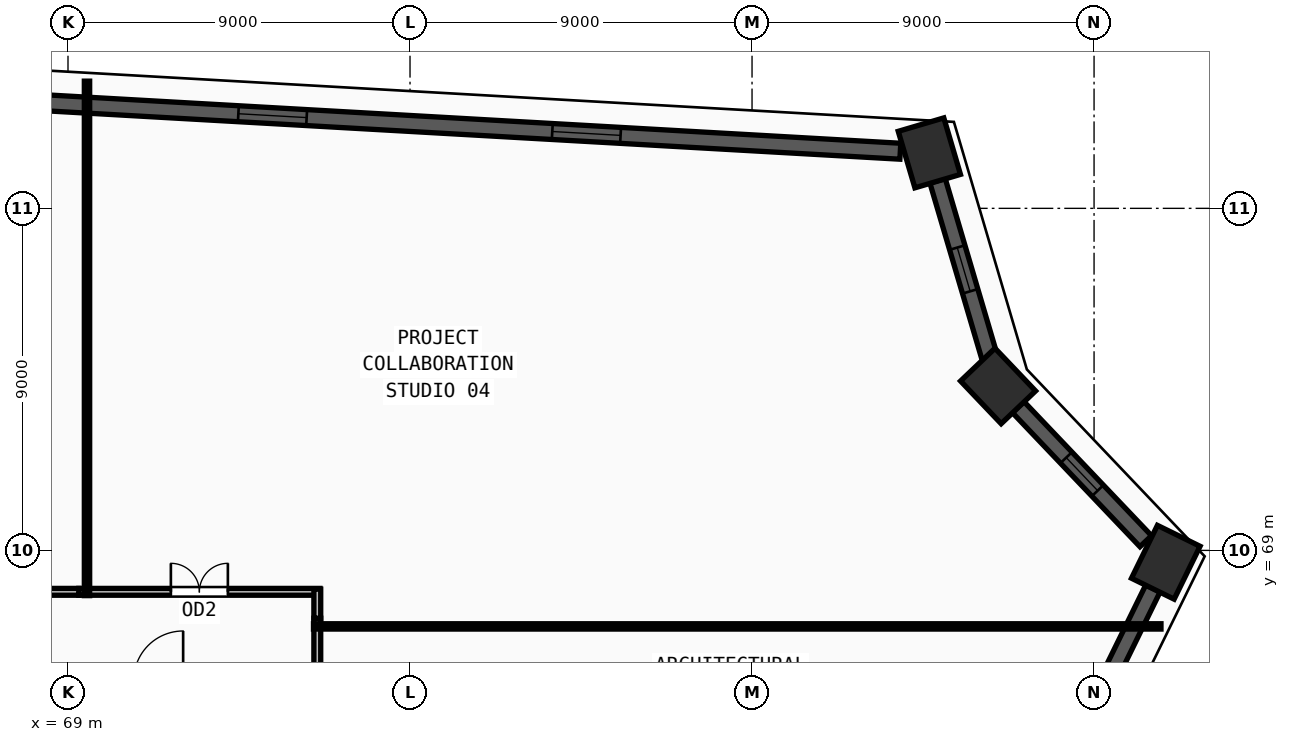
"""IFC4 building model, lengths in metres.
Left out: names, types, materials, properties, quantities, classifications, styles, units other than length and angle.
Written with IfcOpenShell. Run it as: python <this file> out.ifc"""

import sys

from ifc_helpers import new_model, si_unit, direction, frame, frame_2d, origin, origin_2d, place, context, subcontext, project, spatial, rectangle, extrude, source, transform, mapped, element, fill, save


model = new_model("IFC4")
c1 = context("Model", 3, precision=1e-05, world=origin(), true_north=direction((0.0, 1.0)))
c2 = subcontext(c1, "Body", "Model", "MODEL_VIEW")
j1 = project(units=[si_unit("LENGTHUNIT", "METRE"), si_unit("PLANEANGLEUNIT", "RADIAN")], contexts=[c1])
p1 = place(None, origin())
s1 = spatial("IfcSite", under=j1, at=p1, CompositionType="ELEMENT")
p2 = place(p1, origin())
s2 = spatial("IfcBuilding", under=s1, at=p2, CompositionType="ELEMENT")
p3 = place(p2, frame((0.0, 0.0, 74.25)))
s3 = spatial("IfcBuildingStorey", under=s2, at=p3, CompositionType="ELEMENT", Elevation=74.25)
m1 = source(origin(), c2, "Body", "SweptSolid", [
    extrude(rectangle(XDim=1.55, YDim=1.25, at=origin_2d()), origin(), (0.0, 0.0, 1.0), 3.75),
])
for number, where, z_axis, x_axis in (
    (1, (91.666, 79.46, 0.0), (0.0, 0.0, 1.0), (-0.283, 0.959, 0.0)),
    (2, (93.474, 73.326, 0.0), (0.0, 0.0, 1.0), (-0.689, 0.724, 0.0)),
    (3, (97.887, 68.688, 0.0), (0.0, 0.0, 1.0), (0.44, 0.898, 0.0)),
):
    element("IfcColumn", number, at=place(p3, frame(where, z_axis=z_axis, x_axis=x_axis)), inside=s3, PredefinedType="COLUMN", context=c2, shape_type="MappedRepresentation", body=[
        mapped(m1, transform((0.0, 0.0, 0.0), x_axis=(1.0, 0.0, 0.0), y_axis=(0.0, 1.0, 0.0), z_axis=(0.0, 0.0, 1.0), scale=1.0)),
    ])
p4 = place(p3, frame((85.533, 43.493, 0.0), z_axis=(0.0, 0.0, 1.0), x_axis=(0.440255770672, 0.897872405406, 0.0)))
e4 = element("IfcWall", 4, at=p4, inside=s3, PredefinedType="SOLIDWALL", context=c2, shape_type="SweptSolid", body=[
    extrude(rectangle(XDim=27.296, YDim=0.42, at=frame_2d((13.648, 0.0))), origin(), (0.0, 0.0, 1.0), 3.57),
])
m2 = source(origin(), c2, "Body", "SweptSolid", [
    extrude(rectangle(XDim=1.8, YDim=1.95, at=frame_2d((0.9, 0.975))), frame((0.0, 0.22, 0.0), z_axis=(0.0, -1.0, 0.0), x_axis=(1.0, 0.0, 0.0)), (0.0, 0.0, 1.0), 0.44),
])
p5 = place(p4, frame((5.074, 0.0, 0.55)))
e5 = element("IfcOpeningElement", 5, at=p5, cuts=e4, PredefinedType="OPENING", context=c2, shape_type="MappedRepresentation", body=[
    mapped(m2, transform((0.0, 0.0, 0.0), x_axis=(1.0, 0.0, 0.0), y_axis=(0.0, 1.0, 0.0), z_axis=(0.0, 0.0, 1.0), scale=1.0)),
])
p6 = place(p4, frame((11.898, 0.0, 0.55)))
e6 = element("IfcOpeningElement", 6, at=p6, cuts=e4, PredefinedType="OPENING", context=c2, shape_type="MappedRepresentation", body=[
    mapped(m2, transform((0.0, 0.0, 0.0), x_axis=(1.0, 0.0, 0.0), y_axis=(0.0, 1.0, 0.0), z_axis=(0.0, 0.0, 1.0), scale=1.0)),
])
p7 = place(p4, frame((19.572, 0.0, 0.55)))
e7 = element("IfcOpeningElement", 7, at=p7, cuts=e4, PredefinedType="OPENING", context=c2, shape_type="MappedRepresentation", body=[
    mapped(m2, transform((0.0, 0.0, 0.0), x_axis=(1.0, 0.0, 0.0), y_axis=(0.0, 1.0, 0.0), z_axis=(0.0, 0.0, 1.0), scale=1.0)),
])
p8 = place(p3, frame((97.36, 69.242, 0.0), z_axis=(0.0, 0.0, 1.0), x_axis=(-0.689353606937, 0.724425016549, 0.0)))
e8 = element("IfcWall", 8, at=p8, inside=s3, PredefinedType="SOLIDWALL", context=c2, shape_type="SweptSolid", body=[
    extrude(rectangle(XDim=4.873, YDim=0.42, at=frame_2d((2.437, 0.0))), origin(), (0.0, 0.0, 1.0), 3.57),
])
m3 = source(origin(), c2, "Body", "SweptSolid", [
    extrude(rectangle(XDim=1.2, YDim=1.9, at=frame_2d((0.6, 0.95))), frame((0.0, 0.22, 0.0), z_axis=(0.0, -1.0, 0.0), x_axis=(1.0, 0.0, 0.0)), (0.0, 0.0, 1.0), 0.44),
])
p9 = place(p8, frame((1.836, 0.0, 0.55)))
e9 = element("IfcOpeningElement", 9, at=p9, cuts=e8, PredefinedType="OPENING", context=c2, shape_type="MappedRepresentation", body=[
    mapped(m3, transform((0.0, 0.0, 0.0), x_axis=(1.0, 0.0, 0.0), y_axis=(0.0, 1.0, 0.0), z_axis=(0.0, 0.0, 1.0), scale=1.0)),
])
p10 = place(p3, frame((93.258, 74.06, 0.0), z_axis=(0.0, 0.0, 1.0), x_axis=(-0.282850961841, 0.959163872019, 0.0)))
e10 = element("IfcWall", 10, at=p10, inside=s3, PredefinedType="SOLIDWALL", context=c2, shape_type="SweptSolid", body=[
    extrude(rectangle(XDim=4.865, YDim=0.42, at=frame_2d((2.432, 0.0))), origin(), (0.0, 0.0, 1.0), 3.57),
])
p11 = place(p10, frame((1.832, 0.0, 0.55)))
e11 = element("IfcOpeningElement", 11, at=p11, cuts=e10, PredefinedType="OPENING", context=c2, shape_type="MappedRepresentation", body=[
    mapped(m3, transform((0.0, 0.0, 0.0), x_axis=(1.0, 0.0, 0.0), y_axis=(0.0, 1.0, 0.0), z_axis=(0.0, 0.0, 1.0), scale=1.0)),
])
p12 = place(p3, frame((90.902, 79.503, 0.0), z_axis=(0.0, 0.0, 1.0), x_axis=(-0.998398734181, 0.056568255998, 0.0)))
e12 = element("IfcWall", 12, at=p12, inside=s3, PredefinedType="SOLIDWALL", context=c2, shape_type="SweptSolid", body=[
    extrude(rectangle(XDim=33.094, YDim=0.42, at=frame_2d((16.547, 0.0))), origin(), (0.0, 0.0, 1.0), 3.57),
])
p13 = place(p12, frame((7.373, 0.0, 0.55)))
e13 = element("IfcOpeningElement", 13, at=p13, cuts=e12, PredefinedType="OPENING", context=c2, shape_type="MappedRepresentation", body=[
    mapped(m2, transform((0.0, 0.0, 0.0), x_axis=(1.0, 0.0, 0.0), y_axis=(0.0, 1.0, 0.0), z_axis=(0.0, 0.0, 1.0), scale=1.0)),
])
p14 = place(p12, frame((15.647, 0.0, 0.55)))
e14 = element("IfcOpeningElement", 14, at=p14, cuts=e12, PredefinedType="OPENING", context=c2, shape_type="MappedRepresentation", body=[
    mapped(m2, transform((0.0, 0.0, 0.0), x_axis=(1.0, 0.0, 0.0), y_axis=(0.0, 1.0, 0.0), z_axis=(0.0, 0.0, 1.0), scale=1.0)),
])
p15 = place(p12, frame((23.92, 0.0, 0.55)))
e15 = element("IfcOpeningElement", 15, at=p15, cuts=e12, PredefinedType="OPENING", context=c2, shape_type="MappedRepresentation", body=[
    mapped(m2, transform((0.0, 0.0, 0.0), x_axis=(1.0, 0.0, 0.0), y_axis=(0.0, 1.0, 0.0), z_axis=(0.0, 0.0, 1.0), scale=1.0)),
])
p16 = place(p3, frame((75.56, 67.215, 0.0), z_axis=(0.0, 0.0, 1.0), x_axis=(0.0, -1.0, 0.0)))
e16 = element("IfcWall", 16, at=p16, inside=s3, PredefinedType="PARTITIONING", context=c2, shape_type="SweptSolid", body=[
    extrude(rectangle(XDim=3.5, YDim=0.18, at=frame_2d((1.75, 0.0))), origin(), (0.0, 0.0, 1.0), 3.57),
])
m4 = source(origin(), c2, "Body", "SweptSolid", [
    extrude(rectangle(XDim=1.0, YDim=2.2, at=frame_2d((0.5, 1.1))), frame((0.0, 0.1, 0.0), z_axis=(0.0, -1.0, 0.0), x_axis=(1.0, 0.0, 0.0)), (0.0, 0.0, 1.0), 0.2),
])
p17 = place(p16, frame((1.25, 0.0, 0.0)))
e17 = element("IfcOpeningElement", 17, at=p17, cuts=e16, PredefinedType="OPENING", context=c2, shape_type="MappedRepresentation", body=[
    mapped(m4, transform((0.0, 0.0, 0.0), x_axis=(1.0, 0.0, 0.0), y_axis=(0.0, 1.0, 0.0), z_axis=(0.0, 0.0, 1.0), scale=1.0)),
])
p18 = place(p3, frame((69.285, 67.91, 0.0), z_axis=(0.0, 0.0, 1.0), x_axis=(1.0, 0.0, 0.0)))
e18 = element("IfcWall", 18, at=p18, inside=s3, PredefinedType="PARTITIONING", context=c2, shape_type="SweptSolid", body=[
    extrude(rectangle(XDim=6.345, YDim=0.18, at=frame_2d((3.172, 0.0))), origin(), (0.0, 0.0, 1.0), 3.57),
])
m5 = source(origin(), c2, "Body", "SweptSolid", [
    extrude(rectangle(XDim=1.5, YDim=2.2, at=frame_2d((0.75, 1.1))), frame((0.0, 0.1, 0.0), z_axis=(0.0, -1.0, 0.0), x_axis=(1.0, 0.0, 0.0)), (0.0, 0.0, 1.0), 0.2),
])
p19 = place(p18, frame((2.422, 0.0, 0.0)))
e19 = element("IfcOpeningElement", 19, at=p19, cuts=e18, PredefinedType="OPENING", context=c2, shape_type="MappedRepresentation", body=[
    mapped(m5, transform((0.0, 0.0, 0.0), x_axis=(1.0, 0.0, 0.0), y_axis=(0.0, 1.0, 0.0), z_axis=(0.0, 0.0, 1.0), scale=1.0)),
])
p20 = place(p3, frame((75.56, 67.98, 0.0), z_axis=(0.0, 0.0, 1.0), x_axis=(0.0, -1.0, 0.0)))
e20 = element("IfcWall", 20, at=p20, inside=s3, PredefinedType="PARTITIONING", context=c2, shape_type="SweptSolid", body=[
    extrude(rectangle(XDim=0.765, YDim=0.18, at=frame_2d((0.382, 0.0))), origin(), (0.0, 0.0, 1.0), 3.57),
])
p21 = place(p3, frame((61.09, 67.91, 0.0), z_axis=(0.0, 0.0, 1.0), x_axis=(1.0, 0.0, 0.0)))
e21 = element("IfcWall", 21, at=p21, inside=s3, PredefinedType="PARTITIONING", context=c2, shape_type="SweptSolid", body=[
    extrude(rectangle(XDim=8.195, YDim=0.18, at=frame_2d((4.097, 0.0))), origin(), (0.0, 0.0, 1.0), 3.57),
])
p22 = place(p3, frame((75.46, 67.0, 0.0), z_axis=(0.0, 0.0, 1.0), x_axis=(1.0, 0.0, 0.0)))
e22 = element("IfcWall", 22, at=p22, inside=s3, PredefinedType="PARTITIONING", context=c2, shape_type="SweptSolid", body=[
    extrude(rectangle(XDim=22.301, YDim=0.14, at=frame_2d((11.15, 0.0))), origin(), (0.0, 0.0, 1.0), 2.655),
])
p23 = place(p3, frame((69.5, 67.81, 0.0), z_axis=(0.0, 0.0, 1.0), x_axis=(0.0, 1.0, 0.0)))
e23 = element("IfcWall", 23, at=p23, inside=s3, PredefinedType="PARTITIONING", context=c2, shape_type="SweptSolid", body=[
    extrude(rectangle(XDim=13.537, YDim=0.14, at=frame_2d((6.769, 0.0))), origin(), (0.0, 0.0, 1.0), 3.57),
])
m6 = source(origin(), c2, "Body", "SweptSolid", [
    extrude(rectangle(XDim=1.2, YDim=1.9, at=frame_2d((0.6, 0.95))), frame((0.0, 0.03, 0.0), z_axis=(0.0, -1.0, 0.0), x_axis=(1.0, 0.0, 0.0)), (0.0, 0.0, 1.0), 0.06),
])
p24 = place(p9, origin())
e24 = element("IfcWindow", 24, at=p24, inside=s3, PartitioningType="SINGLE_PANEL", PredefinedType="WINDOW", context=c2, shape_type="MappedRepresentation", body=[
    mapped(m6, transform((0.0, 0.0, 0.0), x_axis=(1.0, 0.0, 0.0), y_axis=(0.0, 1.0, 0.0), z_axis=(0.0, 0.0, 1.0), scale=1.0)),
])
fill(e9, e24)
p25 = place(p11, origin())
e25 = element("IfcWindow", 25, at=p25, inside=s3, PartitioningType="SINGLE_PANEL", PredefinedType="WINDOW", context=c2, shape_type="MappedRepresentation", body=[
    mapped(m6, transform((0.0, 0.0, 0.0), x_axis=(1.0, 0.0, 0.0), y_axis=(0.0, 1.0, 0.0), z_axis=(0.0, 0.0, 1.0), scale=1.0)),
])
fill(e11, e25)
m7 = source(origin(), c2, "Body", "SweptSolid", [
    extrude(rectangle(XDim=1.8, YDim=1.95, at=frame_2d((0.9, 0.975))), frame((0.0, 0.03, 0.0), z_axis=(0.0, -1.0, 0.0), x_axis=(1.0, 0.0, 0.0)), (0.0, 0.0, 1.0), 0.06),
])
p26 = place(p13, origin())
e26 = element("IfcWindow", 26, at=p26, inside=s3, PartitioningType="DOUBLE_PANEL_VERTICAL", PredefinedType="WINDOW", context=c2, shape_type="MappedRepresentation", body=[
    mapped(m7, transform((0.0, 0.0, 0.0), x_axis=(1.0, 0.0, 0.0), y_axis=(0.0, 1.0, 0.0), z_axis=(0.0, 0.0, 1.0), scale=1.0)),
])
fill(e13, e26)
p27 = place(p14, origin())
e27 = element("IfcWindow", 27, at=p27, inside=s3, PartitioningType="DOUBLE_PANEL_VERTICAL", PredefinedType="WINDOW", context=c2, shape_type="MappedRepresentation", body=[
    mapped(m7, transform((0.0, 0.0, 0.0), x_axis=(1.0, 0.0, 0.0), y_axis=(0.0, 1.0, 0.0), z_axis=(0.0, 0.0, 1.0), scale=1.0)),
])
fill(e14, e27)
m8 = source(origin(), c2, "Body", "SweptSolid", [
    extrude(rectangle(XDim=1.5, YDim=2.2, at=frame_2d((0.75, 1.1))), frame((0.0, 0.025, 0.0), z_axis=(0.0, -1.0, 0.0), x_axis=(1.0, 0.0, 0.0)), (0.0, 0.0, 1.0), 0.05),
])
p28 = place(p19, origin())
e28 = element("IfcDoor", 28, at=p28, inside=s3, OperationType="DOUBLE_DOOR_SINGLE_SWING", PredefinedType="DOOR", context=c2, shape_type="MappedRepresentation", body=[
    mapped(m8, transform((0.0, 0.0, 0.0), x_axis=(1.0, 0.0, 0.0), y_axis=(0.0, 1.0, 0.0), z_axis=(0.0, 0.0, 1.0), scale=1.0)),
])
fill(e19, e28)
save(model, sys.argv[1])
